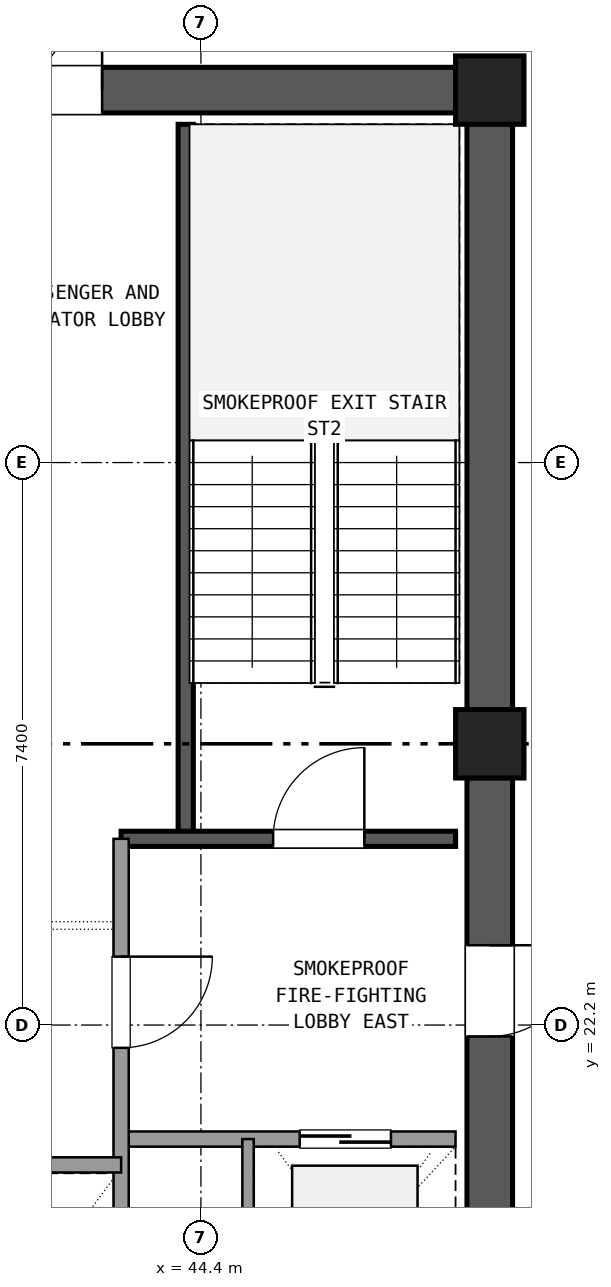
"""IFC4 building model, lengths in metres.
Left out: names, types, materials, properties, quantities, classifications, styles, units other than length and angle.
Written with IfcOpenShell. Run it as: python <this file> out.ifc"""

import sys

from ifc_helpers import new_model, si_unit, direction, frame, frame_2d, origin, origin_2d, place, context, subcontext, project, spatial, rectangle, extrude, element, fill, save


model = new_model("IFC4")
c1 = context("Model", 3, precision=1e-05, world=origin(), true_north=direction((0.0, 1.0)))
c2 = subcontext(c1, "Body", "Model", "MODEL_VIEW")
j1 = project(units=[si_unit("LENGTHUNIT", "METRE"), si_unit("PLANEANGLEUNIT", "RADIAN")], contexts=[c1])
p1 = place(None, origin())
s1 = spatial("IfcSite", under=j1, at=p1, CompositionType="ELEMENT")
p2 = place(p1, origin())
s2 = spatial("IfcBuilding", under=s1, at=p2, CompositionType="ELEMENT")
p3 = place(p2, frame((0.0, 0.0, 188.46)))
s3 = spatial("IfcBuildingStorey", under=s2, at=p3, CompositionType="ELEMENT", Elevation=188.46)
for number, where, z_axis, x_axis in (
    (1, (48.2, 25.9, 0.0), (0.0, 0.0, 1.0), (1.0, 0.0, 0.0)),
    (2, (48.2, 34.5, 0.0), (0.0, 0.0, 1.0), (1.0, 0.0, 0.0)),
):
    element("IfcColumn", number, at=place(p3, frame(where, z_axis=z_axis, x_axis=x_axis)), inside=s3, PredefinedType="COLUMN", context=c2, shape_type="SweptSolid", body=[
        extrude(rectangle(XDim=0.9, YDim=0.9, at=origin_2d()), origin(), (0.0, 0.0, 1.0), 4.32),
    ])
p4 = place(p3, frame((48.2, 17.745, 0.0), z_axis=(0.0, 0.0, 1.0), x_axis=(0.0, 1.0, 0.0)))
e3 = element("IfcWall", 3, at=p4, inside=s3, PredefinedType="SHEAR", context=c2, shape_type="SweptSolid", body=[
    extrude(rectangle(XDim=7.71, YDim=0.6, at=frame_2d((3.855, 0.0))), origin(), (0.0, 0.0, 1.0), 4.04),
])
p5 = place(p4, frame((4.305, 0.0, 0.0)))
e4 = element("IfcOpeningElement", 4, at=p5, cuts=e3, PredefinedType="OPENING", context=c2, shape_type="SweptSolid", body=[
    extrude(rectangle(XDim=1.2, YDim=2.15, at=frame_2d((0.6, 1.075))), frame((0.0, 0.31, 0.0), z_axis=(0.0, -1.0, 0.0), x_axis=(1.0, 0.0, 0.0)), (0.0, 0.0, 1.0), 0.62),
])
p6 = place(p3, frame((48.2, 26.345, 0.0), z_axis=(0.0, 0.0, 1.0), x_axis=(0.0, 1.0, 0.0)))
e5 = element("IfcWall", 5, at=p6, inside=s3, PredefinedType="SHEAR", context=c2, shape_type="SweptSolid", body=[
    extrude(rectangle(XDim=7.71, YDim=0.6, at=frame_2d((3.855, 0.0))), origin(), (0.0, 0.0, 1.0), 4.04),
])
p7 = place(p3, frame((47.755, 34.5, 0.0), z_axis=(0.0, 0.0, 1.0), x_axis=(-1.0, 0.0, 0.0)))
e6 = element("IfcWall", 6, at=p7, inside=s3, PredefinedType="SHEAR", context=c2, shape_type="SweptSolid", body=[
    extrude(rectangle(XDim=10.31, YDim=0.6, at=frame_2d((5.155, 0.0))), origin(), (0.0, 0.0, 1.0), 4.04),
])
p8 = place(p7, frame((4.655, 0.0, 0.0)))
e7 = element("IfcOpeningElement", 7, at=p8, cuts=e6, PredefinedType="OPENING", context=c2, shape_type="SweptSolid", body=[
    extrude(rectangle(XDim=1.6, YDim=2.2, at=frame_2d((0.8, 1.1))), frame((0.0, 0.31, 0.0), z_axis=(0.0, -1.0, 0.0), x_axis=(1.0, 0.0, 0.0)), (0.0, 0.0, 1.0), 0.62),
])
p9 = place(p3, frame((44.2, 24.65, 0.0), z_axis=(0.0, 0.0, 1.0), x_axis=(0.0, 1.0, 0.0)))
e8 = element("IfcWall", 8, at=p9, inside=s3, PredefinedType="SHEAR", context=c2, shape_type="SweptSolid", body=[
    extrude(rectangle(XDim=9.4, YDim=0.2, at=frame_2d((4.7, 0.0))), origin(), (0.0, 0.0, 1.0), 4.04),
])
p10 = place(p3, frame((43.35, 24.65, 0.0), z_axis=(0.0, 0.0, 1.0), x_axis=(1.0, 0.0, 0.0)))
e9 = element("IfcWall", 9, at=p10, inside=s3, PredefinedType="SHEAR", context=c2, shape_type="SweptSolid", body=[
    extrude(rectangle(XDim=4.4, YDim=0.2, at=frame_2d((2.2, 0.0))), origin(), (0.0, 0.0, 1.0), 4.04),
])
p11 = place(p10, frame((2.0, 0.0, 0.0)))
e10 = element("IfcOpeningElement", 10, at=p11, cuts=e9, PredefinedType="OPENING", context=c2, shape_type="SweptSolid", body=[
    extrude(rectangle(XDim=1.2, YDim=2.15, at=frame_2d((0.6, 1.075))), frame((0.0, 0.11, 0.0), z_axis=(0.0, -1.0, 0.0), x_axis=(1.0, 0.0, 0.0)), (0.0, 0.0, 1.0), 0.22),
])
p12 = place(p3, frame((43.35, 20.7, 0.0), z_axis=(0.0, 0.0, 1.0), x_axis=(1.0, 0.0, 0.0)))
e11 = element("IfcWall", 11, at=p12, inside=s3, PredefinedType="SOLIDWALL", context=c2, shape_type="SweptSolid", body=[
    extrude(rectangle(XDim=4.4, YDim=0.2, at=frame_2d((2.2, 0.0))), origin(), (0.0, 0.0, 1.0), 2.95),
])
p13 = place(p12, frame((2.35, 0.0, 0.0)))
e12 = element("IfcOpeningElement", 12, at=p13, cuts=e11, PredefinedType="OPENING", context=c2, shape_type="SweptSolid", body=[
    extrude(rectangle(XDim=1.2, YDim=2.15, at=frame_2d((0.6, 1.075))), frame((0.0, 0.11, 0.0), z_axis=(0.0, -1.0, 0.0), x_axis=(1.0, 0.0, 0.0)), (0.0, 0.0, 1.0), 0.22),
])
p14 = place(p3, frame((43.35, 17.75, 0.0), z_axis=(0.0, 0.0, 1.0), x_axis=(0.0, 1.0, 0.0)))
e13 = element("IfcWall", 13, at=p14, inside=s3, PredefinedType="SOLIDWALL", context=c2, shape_type="SweptSolid", body=[
    extrude(rectangle(XDim=6.9, YDim=0.2, at=frame_2d((3.45, 0.0))), origin(), (0.0, 0.0, 1.0), 2.95),
])
p15 = place(p14, frame((4.15, 0.0, 0.0)))
e14 = element("IfcOpeningElement", 14, at=p15, cuts=e13, PredefinedType="OPENING", context=c2, shape_type="SweptSolid", body=[
    extrude(rectangle(XDim=1.2, YDim=2.15, at=frame_2d((0.6, 1.075))), frame((0.0, 0.11, 0.0), z_axis=(0.0, -1.0, 0.0), x_axis=(1.0, 0.0, 0.0)), (0.0, 0.0, 1.0), 0.22),
])
p16 = place(p3, frame((45.02, 17.75, 0.0), z_axis=(0.0, 0.0, 1.0), x_axis=(0.0, 1.0, 0.0)))
e15 = element("IfcWall", 15, at=p16, inside=s3, PredefinedType="PARTITIONING", context=c2, shape_type="SweptSolid", body=[
    extrude(rectangle(XDim=2.95, YDim=0.15, at=frame_2d((1.475, 0.0))), origin(), (0.0, 0.0, 1.0), 2.95),
])
p17 = place(p3, frame((37.25, 20.36, 0.0), z_axis=(0.0, 0.0, 1.0), x_axis=(1.0, 0.0, 0.0)))
e16 = element("IfcWall", 16, at=p17, inside=s3, PredefinedType="SOLIDWALL", context=c2, shape_type="SweptSolid", body=[
    extrude(rectangle(XDim=6.1, YDim=0.2, at=frame_2d((3.05, 0.0))), origin(), (0.0, 0.0, 1.0), 2.95),
])
p18 = place(p11, origin())
e17 = element("IfcDoor", 17, at=p18, inside=s3, OperationType="SINGLE_SWING_RIGHT", PredefinedType="DOOR", context=c2, shape_type="SweptSolid", body=[
    extrude(rectangle(XDim=1.2, YDim=2.15, at=frame_2d((0.6, 1.075))), frame((0.0, 0.025, 0.0), z_axis=(0.0, -1.0, 0.0), x_axis=(1.0, 0.0, 0.0)), (0.0, 0.0, 1.0), 0.05),
])
fill(e10, e17)
p19 = place(p13, origin())
e18 = element("IfcDoor", 18, at=p19, inside=s3, OperationType="SLIDING_TO_RIGHT", PredefinedType="DOOR", context=c2, shape_type="SweptSolid", body=[
    extrude(rectangle(XDim=1.2, YDim=2.15, at=frame_2d((0.6, 1.075))), frame((0.0, 0.025, 0.0), z_axis=(0.0, -1.0, 0.0), x_axis=(1.0, 0.0, 0.0)), (0.0, 0.0, 1.0), 0.05),
])
fill(e12, e18)
p20 = place(p15, frame((1.2, 0.0, 0.0), z_axis=(0.0, 0.0, 1.0), x_axis=(-1.0, 0.0, 0.0)))
e19 = element("IfcDoor", 19, at=p20, inside=s3, OperationType="SINGLE_SWING_RIGHT", PredefinedType="DOOR", context=c2, shape_type="SweptSolid", body=[
    extrude(rectangle(XDim=1.2, YDim=2.15, at=frame_2d((0.6, 1.075))), frame((0.0, 0.025, 0.0), z_axis=(0.0, -1.0, 0.0), x_axis=(1.0, 0.0, 0.0)), (0.0, 0.0, 1.0), 0.05),
])
fill(e14, e19)
p21 = place(p5, frame((1.2, 0.0, 0.0), z_axis=(0.0, 0.0, 1.0), x_axis=(-1.0, 0.0, 0.0)))
e20 = element("IfcDoor", 20, at=p21, inside=s3, OperationType="SINGLE_SWING_RIGHT", PredefinedType="DOOR", context=c2, shape_type="SweptSolid", body=[
    extrude(rectangle(XDim=1.2, YDim=2.15, at=frame_2d((0.6, 1.075))), frame((0.0, 0.025, 0.0), z_axis=(0.0, -1.0, 0.0), x_axis=(1.0, 0.0, 0.0)), (0.0, 0.0, 1.0), 0.05),
])
fill(e4, e20)
p22 = place(p8, frame((1.6, 0.0, 0.0), z_axis=(0.0, 0.0, 1.0), x_axis=(-1.0, 0.0, 0.0)))
e21 = element("IfcDoor", 21, at=p22, inside=s3, OperationType="DOUBLE_DOOR_SINGLE_SWING", PredefinedType="DOOR", context=c2, shape_type="SweptSolid", body=[
    extrude(rectangle(XDim=1.6, YDim=2.2, at=frame_2d((0.8, 1.1))), frame((0.0, 0.025, 0.0), z_axis=(0.0, -1.0, 0.0), x_axis=(1.0, 0.0, 0.0)), (0.0, 0.0, 1.0), 0.05),
])
fill(e7, e21)
save(model, sys.argv[1])
